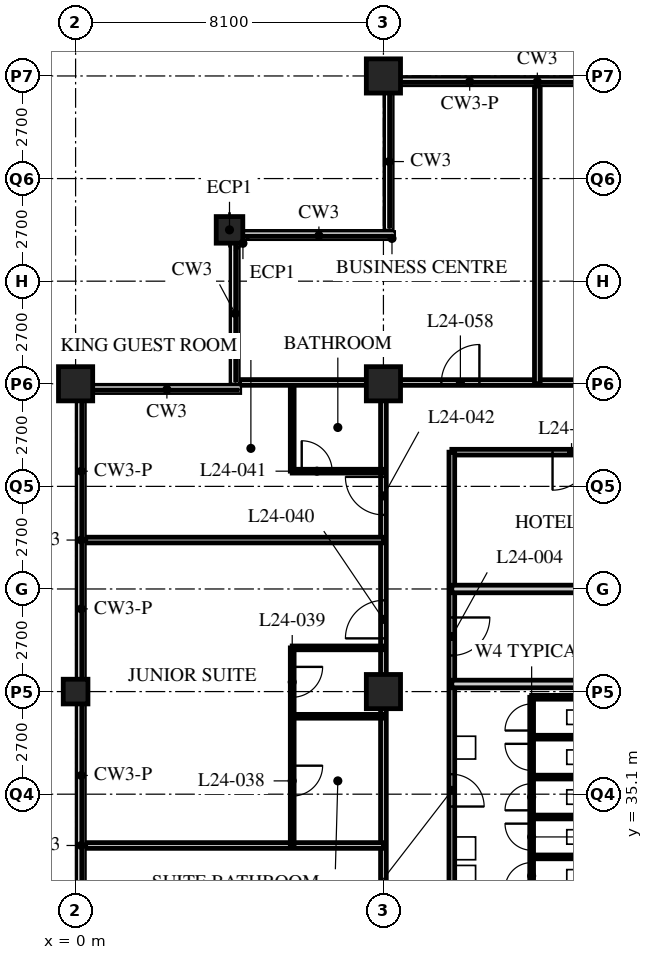
"""IFC4 building model, lengths in metres.
Left out: names, types, materials, properties, quantities, classifications, styles, units other than length and angle.
Written with IfcOpenShell. Run it as: python <this file> out.ifc"""

import sys

from ifc_helpers import new_model, si_unit, direction, frame, frame_2d, origin, origin_2d, place, context, subcontext, project, spatial, rectangle, hollow_rectangle, extrude, element, fill, save


model = new_model("IFC4")
c1 = context("Model", 3, precision=1e-05, world=origin(), true_north=direction((0.0, 1.0)))
c2 = subcontext(c1, "Body", "Model", "MODEL_VIEW")
j1 = project(units=[si_unit("LENGTHUNIT", "METRE"), si_unit("PLANEANGLEUNIT", "RADIAN")], contexts=[c1])
p1 = place(None, origin())
s1 = spatial("IfcSite", under=j1, at=p1, CompositionType="ELEMENT")
p2 = place(p1, origin())
s2 = spatial("IfcBuilding", under=s1, at=p2, CompositionType="ELEMENT")
p3 = place(p2, frame((0.0, 0.0, 98.0)))
s3 = spatial("IfcBuildingStorey", under=s2, at=p3, CompositionType="ELEMENT", Elevation=98.0)
p4 = place(p3, frame((0.0, 37.8, 0.0), z_axis=(0.0, 0.0, 1.0), x_axis=(1.0, 0.0, 0.0)))
e1 = element("IfcColumn", 1, at=p4, inside=s3, PredefinedType="COLUMN", context=c2, shape_type="SweptSolid", body=[
    extrude(hollow_rectangle(XDim=0.65, YDim=0.65, WallThickness=0.05, at=origin_2d()), origin(), (0.0, 0.0, 1.0), 5.4),
])
p5 = place(p3, frame((0.0, 45.9, 0.0), z_axis=(0.0, 0.0, 1.0), x_axis=(1.0, 0.0, 0.0)))
e2 = element("IfcColumn", 2, at=p5, inside=s3, PredefinedType="COLUMN", context=c2, shape_type="SweptSolid", body=[
    extrude(hollow_rectangle(XDim=0.9, YDim=0.9, WallThickness=0.09, at=origin_2d()), origin(), (0.0, 0.0, 1.0), 5.4),
])
p6 = place(p3, frame((4.05, 49.95, 0.0), z_axis=(0.0, 0.0, 1.0), x_axis=(1.0, 0.0, 0.0)))
e3 = element("IfcColumn", 3, at=p6, inside=s3, PredefinedType="COLUMN", context=c2, shape_type="SweptSolid", body=[
    extrude(hollow_rectangle(XDim=0.7, YDim=0.7, WallThickness=0.07, at=origin_2d()), origin(), (0.0, 0.0, 1.0), 5.4),
])
for number, where, z_axis, x_axis in (
    (4, (8.1, 37.8, 0.0), (0.0, 0.0, 1.0), (1.0, 0.0, 0.0)),
    (5, (8.1, 45.9, 0.0), (0.0, 0.0, 1.0), (1.0, 0.0, 0.0)),
):
    element("IfcColumn", number, at=place(p3, frame(where, z_axis=z_axis, x_axis=x_axis)), inside=s3, PredefinedType="COLUMN", context=c2, shape_type="SweptSolid", body=[
        extrude(hollow_rectangle(XDim=0.9, YDim=0.9, WallThickness=0.1, at=origin_2d()), origin(), (0.0, 0.0, 1.0), 5.4),
    ])
p7 = place(p3, frame((8.1, 54.0, 0.0), z_axis=(0.0, 0.0, 1.0), x_axis=(1.0, 0.0, 0.0)))
e6 = element("IfcColumn", 6, at=p7, inside=s3, PredefinedType="COLUMN", context=c2, shape_type="SweptSolid", body=[
    extrude(hollow_rectangle(XDim=0.9, YDim=0.9, WallThickness=0.09, at=origin_2d()), origin(), (0.0, 0.0, 1.0), 5.4),
])
p8 = place(p3, frame((8.1, 45.935, 0.0), z_axis=(0.0, 0.0, 1.0), x_axis=(0.99999962324, -0.000868055229, 0.0)))
e7 = element("IfcWall", 7, at=p8, inside=s3, PredefinedType="PARTITIONING", context=c2, shape_type="SweptSolid", body=[
    extrude(rectangle(XDim=40.5, YDim=0.15, at=frame_2d((20.25, 0.0))), origin(), (0.0, 0.0, 1.0), 4.49),
])
p9 = place(p8, frame((9.225, 0.0, 0.0)))
e8 = element("IfcOpeningElement", 8, at=p9, cuts=e7, PredefinedType="OPENING", context=c2, shape_type="SweptSolid", body=[
    extrude(rectangle(XDim=1.8, YDim=2.4, at=frame_2d((0.9, 1.2))), frame((0.0, 0.085, 0.0), z_axis=(0.0, -1.0, 0.0), x_axis=(1.0, 0.0, 0.0)), (0.0, 0.0, 1.0), 0.17),
])
p10 = place(p8, frame((21.65, 0.0, 0.0)))
e9 = element("IfcOpeningElement", 9, at=p10, cuts=e7, PredefinedType="OPENING", context=c2, shape_type="SweptSolid", body=[
    extrude(rectangle(XDim=1.0, YDim=2.1, at=frame_2d((0.5, 1.05))), frame((0.0, 0.085, 0.0), z_axis=(0.0, -1.0, 0.0), x_axis=(1.0, 0.0, 0.0)), (0.0, 0.0, 1.0), 0.17),
])
p11 = place(p8, frame((29.75, 0.0, 0.0)))
e10 = element("IfcOpeningElement", 10, at=p11, cuts=e7, PredefinedType="OPENING", context=c2, shape_type="SweptSolid", body=[
    extrude(rectangle(XDim=1.0, YDim=2.1, at=frame_2d((0.5, 1.05))), frame((0.0, 0.085, 0.0), z_axis=(0.0, -1.0, 0.0), x_axis=(1.0, 0.0, 0.0)), (0.0, 0.0, 1.0), 0.17),
])
p12 = place(p8, frame((34.85, 0.0, 0.0)))
e11 = element("IfcOpeningElement", 11, at=p12, cuts=e7, PredefinedType="OPENING", context=c2, shape_type="SweptSolid", body=[
    extrude(rectangle(XDim=1.0, YDim=2.1, at=frame_2d((0.5, 1.05))), frame((0.0, 0.085, 0.0), z_axis=(0.0, -1.0, 0.0), x_axis=(1.0, 0.0, 0.0)), (0.0, 0.0, 1.0), 0.17),
])
p13 = place(p8, frame((37.975, 0.0, 0.0)))
e12 = element("IfcOpeningElement", 12, at=p13, cuts=e7, PredefinedType="OPENING", context=c2, shape_type="SweptSolid", body=[
    extrude(rectangle(XDim=1.0, YDim=2.1, at=frame_2d((0.5, 1.05))), frame((0.0, 0.085, 0.0), z_axis=(0.0, -1.0, 0.0), x_axis=(1.0, 0.0, 0.0)), (0.0, 0.0, 1.0), 0.17),
])
p14 = place(p8, frame((1.525, 0.0, 0.0)))
e13 = element("IfcOpeningElement", 13, at=p14, cuts=e7, PredefinedType="OPENING", context=c2, shape_type="SweptSolid", body=[
    extrude(rectangle(XDim=1.0, YDim=2.1, at=frame_2d((0.5, 1.05))), frame((0.0, 0.085, 0.0), z_axis=(0.0, -1.0, 0.0), x_axis=(1.0, 0.0, 0.0)), (0.0, 0.0, 1.0), 0.17),
])
p15 = place(p3, frame((8.1, 13.5, 0.0), z_axis=(0.0, 0.0, 1.0), x_axis=(0.0, 1.0, 0.0)))
e14 = element("IfcWall", 14, at=p15, inside=s3, PredefinedType="PARTITIONING", context=c2, shape_type="SweptSolid", body=[
    extrude(rectangle(XDim=32.435, YDim=0.15, at=frame_2d((16.218, 0.0))), origin(), (0.0, 0.0, 1.0), 4.49),
])
p16 = place(p15, frame((1.525, 0.0, 0.0)))
e15 = element("IfcOpeningElement", 15, at=p16, cuts=e14, PredefinedType="OPENING", context=c2, shape_type="SweptSolid", body=[
    extrude(rectangle(XDim=1.0, YDim=2.1, at=frame_2d((0.5, 1.05))), frame((0.0, 0.085, 0.0), z_axis=(0.0, -1.0, 0.0), x_axis=(1.0, 0.0, 0.0)), (0.0, 0.0, 1.0), 0.17),
])
p17 = place(p15, frame((9.5, 0.0, 0.0)))
e16 = element("IfcOpeningElement", 16, at=p17, cuts=e14, PredefinedType="OPENING", context=c2, shape_type="SweptSolid", body=[
    extrude(rectangle(XDim=1.0, YDim=2.1, at=frame_2d((0.5, 1.05))), frame((0.0, 0.085, 0.0), z_axis=(0.0, -1.0, 0.0), x_axis=(1.0, 0.0, 0.0)), (0.0, 0.0, 1.0), 0.17),
])
p18 = place(p15, frame((17.6, 0.0, 0.0)))
e17 = element("IfcOpeningElement", 17, at=p18, cuts=e14, PredefinedType="OPENING", context=c2, shape_type="SweptSolid", body=[
    extrude(rectangle(XDim=1.0, YDim=2.1, at=frame_2d((0.5, 1.05))), frame((0.0, 0.085, 0.0), z_axis=(0.0, -1.0, 0.0), x_axis=(1.0, 0.0, 0.0)), (0.0, 0.0, 1.0), 0.17),
])
p19 = place(p15, frame((25.7, 0.0, 0.0)))
e18 = element("IfcOpeningElement", 18, at=p19, cuts=e14, PredefinedType="OPENING", context=c2, shape_type="SweptSolid", body=[
    extrude(rectangle(XDim=1.0, YDim=2.1, at=frame_2d((0.5, 1.05))), frame((0.0, 0.085, 0.0), z_axis=(0.0, -1.0, 0.0), x_axis=(1.0, 0.0, 0.0)), (0.0, 0.0, 1.0), 0.17),
])
p20 = place(p15, frame((28.95, 0.0, 0.0)))
e19 = element("IfcOpeningElement", 19, at=p20, cuts=e14, PredefinedType="OPENING", context=c2, shape_type="SweptSolid", body=[
    extrude(rectangle(XDim=1.0, YDim=2.1, at=frame_2d((0.5, 1.05))), frame((0.0, 0.085, 0.0), z_axis=(0.0, -1.0, 0.0), x_axis=(1.0, 0.0, 0.0)), (0.0, 0.0, 1.0), 0.17),
])
p21 = place(p3, frame((27.14, 44.1, 0.0), z_axis=(0.0, 0.0, 1.0), x_axis=(-1.0, 0.0, 0.0)))
e20 = element("IfcWall", 20, at=p21, inside=s3, PredefinedType="PARTITIONING", context=c2, shape_type="SweptSolid", body=[
    extrude(rectangle(XDim=17.24, YDim=0.15, at=frame_2d((8.62, 0.0))), origin(), (0.0, 0.0, 1.0), 5.19),
])
p22 = place(p21, frame((13.59, 0.0, 0.0)))
e21 = element("IfcOpeningElement", 21, at=p22, cuts=e20, PredefinedType="OPENING", context=c2, shape_type="SweptSolid", body=[
    extrude(rectangle(XDim=1.0, YDim=2.1, at=frame_2d((0.5, 1.05))), frame((0.0, 0.085, 0.0), z_axis=(0.0, -1.0, 0.0), x_axis=(1.0, 0.0, 0.0)), (0.0, 0.0, 1.0), 0.17),
])
p23 = place(p21, frame((4.965, 0.0, 0.0)))
e22 = element("IfcOpeningElement", 22, at=p23, cuts=e20, PredefinedType="OPENING", context=c2, shape_type="SweptSolid", body=[
    extrude(rectangle(XDim=1.0, YDim=2.1, at=frame_2d((0.5, 1.05))), frame((0.0, 0.085, 0.0), z_axis=(0.0, -1.0, 0.0), x_axis=(1.0, 0.0, 0.0)), (0.0, 0.0, 1.0), 0.17),
])
p24 = place(p3, frame((9.9, 44.1, 0.0), z_axis=(0.0, 0.0, 1.0), x_axis=(0.0, -1.0, 0.0)))
e23 = element("IfcWall", 23, at=p24, inside=s3, PredefinedType="PARTITIONING", context=c2, shape_type="SweptSolid", body=[
    extrude(rectangle(XDim=28.8, YDim=0.15, at=frame_2d((14.4, 0.0))), origin(), (0.0, 0.0, 1.0), 5.19),
])
p25 = place(p24, frame((16.975, 0.0, 0.0)))
e24 = element("IfcOpeningElement", 24, at=p25, cuts=e23, PredefinedType="OPENING", context=c2, shape_type="SweptSolid", body=[
    extrude(rectangle(XDim=0.85, YDim=2.1, at=frame_2d((0.425, 1.05))), frame((0.0, 0.085, 0.0), z_axis=(0.0, -1.0, 0.0), x_axis=(1.0, 0.0, 0.0)), (0.0, 0.0, 1.0), 0.17),
])
p26 = place(p24, frame((12.85, 0.0, 0.0)))
e25 = element("IfcOpeningElement", 25, at=p26, cuts=e23, PredefinedType="OPENING", context=c2, shape_type="SweptSolid", body=[
    extrude(rectangle(XDim=1.0, YDim=2.1, at=frame_2d((0.5, 1.05))), frame((0.0, 0.085, 0.0), z_axis=(0.0, -1.0, 0.0), x_axis=(1.0, 0.0, 0.0)), (0.0, 0.0, 1.0), 0.17),
])
p27 = place(p24, frame((8.475, 0.0, 0.0)))
e26 = element("IfcOpeningElement", 26, at=p27, cuts=e23, PredefinedType="OPENING", context=c2, shape_type="SweptSolid", body=[
    extrude(rectangle(XDim=0.85, YDim=2.1, at=frame_2d((0.425, 1.05))), frame((0.0, 0.085, 0.0), z_axis=(0.0, -1.0, 0.0), x_axis=(1.0, 0.0, 0.0)), (0.0, 0.0, 1.0), 0.17),
])
p28 = place(p24, frame((4.35, 0.0, 0.0)))
e27 = element("IfcOpeningElement", 27, at=p28, cuts=e23, PredefinedType="OPENING", context=c2, shape_type="SweptSolid", body=[
    extrude(rectangle(XDim=1.0, YDim=2.1, at=frame_2d((0.5, 1.05))), frame((0.0, 0.085, 0.0), z_axis=(0.0, -1.0, 0.0), x_axis=(1.0, 0.0, 0.0)), (0.0, 0.0, 1.0), 0.17),
])
p29 = place(p3, frame((9.9, 38.0, 0.0), z_axis=(0.0, 0.0, 1.0), x_axis=(1.0, 0.0, 0.0)))
e28 = element("IfcWall", 28, at=p29, inside=s3, PredefinedType="SOLIDWALL", context=c2, shape_type="SweptSolid", body=[
    extrude(rectangle(XDim=3.8, YDim=0.2, at=frame_2d((1.9, 0.0))), origin(), (0.0, 0.0, 1.0), 4.49),
])
p30 = place(p3, frame((9.9, 40.5, 0.0), z_axis=(0.0, 0.0, 1.0), x_axis=(1.0, 0.0, 0.0)))
e29 = element("IfcWall", 29, at=p30, inside=s3, PredefinedType="SOLIDWALL", context=c2, shape_type="SweptSolid", body=[
    extrude(rectangle(XDim=6.3, YDim=0.2, at=frame_2d((3.15, 0.0))), origin(), (0.0, 0.0, 1.0), 5.19),
])
p31 = place(p3, frame((8.1, 33.75, 0.0), z_axis=(0.0, 0.0, 1.0), x_axis=(-1.0, 0.0, 0.0)))
e30 = element("IfcWall", 30, at=p31, inside=s3, PredefinedType="PARTITIONING", context=c2, shape_type="SweptSolid", body=[
    extrude(rectangle(XDim=7.835, YDim=0.15, at=frame_2d((3.917, 0.0))), origin(), (0.0, 0.0, 1.0), 5.19),
])
p32 = place(p3, frame((5.7, 33.75, 0.0), z_axis=(0.0, 0.0, 1.0), x_axis=(0.0, 1.0, 0.0)))
e31 = element("IfcWall", 31, at=p32, inside=s3, PredefinedType="PARTITIONING", context=c2, shape_type="SweptSolid", body=[
    extrude(rectangle(XDim=5.2, YDim=0.1, at=frame_2d((2.6, 0.0))), origin(), (0.0, 0.0, 1.0), 5.19),
])
p33 = place(p32, frame((1.3, 0.0, 0.0)))
e32 = element("IfcOpeningElement", 32, at=p33, cuts=e31, PredefinedType="OPENING", context=c2, shape_type="SweptSolid", body=[
    extrude(rectangle(XDim=0.8, YDim=2.1, at=frame_2d((0.4, 1.05))), frame((0.0, 0.06, 0.0), z_axis=(0.0, -1.0, 0.0), x_axis=(1.0, 0.0, 0.0)), (0.0, 0.0, 1.0), 0.12),
])
p34 = place(p32, frame((3.9, 0.0, 0.0)))
e33 = element("IfcOpeningElement", 33, at=p34, cuts=e31, PredefinedType="OPENING", context=c2, shape_type="SweptSolid", body=[
    extrude(rectangle(XDim=0.8, YDim=2.1, at=frame_2d((0.4, 1.05))), frame((0.0, 0.06, 0.0), z_axis=(0.0, -1.0, 0.0), x_axis=(1.0, 0.0, 0.0)), (0.0, 0.0, 1.0), 0.12),
])
for number, where, z_axis, x_axis in (
    (34, (8.1, 37.15, 0.0), (0.0, 0.0, 1.0), (-1.0, 0.0, 0.0)),
    (35, (8.1, 38.95, 0.0), (0.0, 0.0, 1.0), (-1.0, 0.0, 0.0)),
):
    element("IfcWall", number, at=place(p3, frame(where, z_axis=z_axis, x_axis=x_axis)), inside=s3, PredefinedType="PARTITIONING", context=c2, shape_type="SweptSolid", body=[
        extrude(rectangle(XDim=2.4, YDim=0.1, at=frame_2d((1.2, 0.0))), origin(), (0.0, 0.0, 1.0), 5.19),
    ])
p35 = place(p3, frame((8.1, 41.788, 0.0), z_axis=(0.0, 0.0, 1.0), x_axis=(-1.0, 0.0, 0.0)))
e36 = element("IfcWall", 36, at=p35, inside=s3, PredefinedType="PARTITIONING", context=c2, shape_type="SweptSolid", body=[
    extrude(rectangle(XDim=7.835, YDim=0.15, at=frame_2d((3.917, 0.0))), origin(), (0.0, 0.0, 1.0), 5.19),
])
p36 = place(p3, frame((5.7, 43.6, 0.0), z_axis=(0.0, 0.0, 1.0), x_axis=(0.0, 1.0, 0.0)))
e37 = element("IfcWall", 37, at=p36, inside=s3, PredefinedType="PARTITIONING", context=c2, shape_type="SweptSolid", body=[
    extrude(rectangle(XDim=2.335, YDim=0.1, at=frame_2d((1.167, 0.0))), origin(), (0.0, 0.0, 1.0), 5.19),
])
p37 = place(p3, frame((8.1, 43.6, 0.0), z_axis=(0.0, 0.0, 1.0), x_axis=(-1.0, 0.0, 0.0)))
e38 = element("IfcWall", 38, at=p37, inside=s3, PredefinedType="PARTITIONING", context=c2, shape_type="SweptSolid", body=[
    extrude(rectangle(XDim=2.4, YDim=0.1, at=frame_2d((1.2, 0.0))), origin(), (0.0, 0.0, 1.0), 5.19),
])
p38 = place(p37, frame((1.35, 0.0, 0.0)))
e39 = element("IfcOpeningElement", 39, at=p38, cuts=e38, PredefinedType="OPENING", context=c2, shape_type="SweptSolid", body=[
    extrude(rectangle(XDim=0.8, YDim=2.1, at=frame_2d((0.4, 1.05))), frame((0.0, 0.06, 0.0), z_axis=(0.0, -1.0, 0.0), x_axis=(1.0, 0.0, 0.0)), (0.0, 0.0, 1.0), 0.12),
])
p39 = place(p3, frame((4.315, 45.935, 0.0), z_axis=(0.0, 0.0, 1.0), x_axis=(1.0, 0.0, 0.0)))
e40 = element("IfcWall", 40, at=p39, inside=s3, PredefinedType="PARTITIONING", context=c2, shape_type="SweptSolid", body=[
    extrude(rectangle(XDim=3.785, YDim=0.15, at=frame_2d((1.892, 0.0))), origin(), (0.0, 0.0, 1.0), 4.49),
])
p40 = place(p3, frame((12.15, 45.9, 0.0), z_axis=(0.0, 0.0, 1.0), x_axis=(0.0, 1.0, 0.0)))
e41 = element("IfcWall", 41, at=p40, inside=s3, PredefinedType="PARTITIONING", context=c2, shape_type="SweptSolid", body=[
    extrude(rectangle(XDim=7.835, YDim=0.15, at=frame_2d((3.917, 0.0))), origin(), (0.0, 0.0, 1.0), 5.19),
])
p41 = place(p3, frame((12.0, 32.4, 0.0), z_axis=(0.0, 0.0, 1.0), x_axis=(0.0, 1.0, 0.0)))
e42 = element("IfcWall", 42, at=p41, inside=s3, PredefinedType="PARTITIONING", context=c2, shape_type="SweptSolid", body=[
    extrude(rectangle(XDim=5.25, YDim=0.1, at=frame_2d((2.625, 0.0))), origin(), (0.0, 0.0, 1.0), 5.19),
])
p42 = place(p41, frame((0.2, 0.0, 0.0)))
e43 = element("IfcOpeningElement", 43, at=p42, cuts=e42, PredefinedType="OPENING", context=c2, shape_type="SweptSolid", body=[
    extrude(rectangle(XDim=0.7, YDim=2.0, at=frame_2d((0.35, 1.0))), frame((0.0, 0.06, 0.0), z_axis=(0.0, -1.0, 0.0), x_axis=(1.0, 0.0, 0.0)), (0.0, 0.0, 1.0), 0.12),
])
p43 = place(p41, frame((1.225, 0.0, 0.0)))
e44 = element("IfcOpeningElement", 44, at=p43, cuts=e42, PredefinedType="OPENING", context=c2, shape_type="SweptSolid", body=[
    extrude(rectangle(XDim=0.7, YDim=2.0, at=frame_2d((0.35, 1.0))), frame((0.0, 0.06, 0.0), z_axis=(0.0, -1.0, 0.0), x_axis=(1.0, 0.0, 0.0)), (0.0, 0.0, 1.0), 0.12),
])
p44 = place(p41, frame((2.275, 0.0, 0.0)))
e45 = element("IfcOpeningElement", 45, at=p44, cuts=e42, PredefinedType="OPENING", context=c2, shape_type="SweptSolid", body=[
    extrude(rectangle(XDim=0.7, YDim=2.0, at=frame_2d((0.35, 1.0))), frame((0.0, 0.06, 0.0), z_axis=(0.0, -1.0, 0.0), x_axis=(1.0, 0.0, 0.0)), (0.0, 0.0, 1.0), 0.12),
])
p45 = place(p41, frame((3.325, 0.0, 0.0)))
e46 = element("IfcOpeningElement", 46, at=p45, cuts=e42, PredefinedType="OPENING", context=c2, shape_type="SweptSolid", body=[
    extrude(rectangle(XDim=0.7, YDim=2.0, at=frame_2d((0.35, 1.0))), frame((0.0, 0.06, 0.0), z_axis=(0.0, -1.0, 0.0), x_axis=(1.0, 0.0, 0.0)), (0.0, 0.0, 1.0), 0.12),
])
p46 = place(p41, frame((4.375, 0.0, 0.0)))
e47 = element("IfcOpeningElement", 47, at=p46, cuts=e42, PredefinedType="OPENING", context=c2, shape_type="SweptSolid", body=[
    extrude(rectangle(XDim=0.7, YDim=2.0, at=frame_2d((0.35, 1.0))), frame((0.0, 0.06, 0.0), z_axis=(0.0, -1.0, 0.0), x_axis=(1.0, 0.0, 0.0)), (0.0, 0.0, 1.0), 0.12),
])
for number, where, z_axis, x_axis in (
    (48, (12.0, 33.45, 0.0), (0.0, 0.0, 1.0), (1.0, 0.0, 0.0)),
    (49, (12.0, 34.5, 0.0), (0.0, 0.0, 1.0), (1.0, 0.0, 0.0)),
    (50, (12.0, 35.55, 0.0), (0.0, 0.0, 1.0), (1.0, 0.0, 0.0)),
    (51, (12.0, 36.6, 0.0), (0.0, 0.0, 1.0), (1.0, 0.0, 0.0)),
):
    element("IfcWall", number, at=place(p3, frame(where, z_axis=z_axis, x_axis=x_axis)), inside=s3, PredefinedType="PARTITIONING", context=c2, shape_type="SweptSolid", body=[
        extrude(rectangle(XDim=1.7, YDim=0.1, at=frame_2d((0.85, 0.0))), origin(), (0.0, 0.0, 1.0), 5.19),
    ])
p47 = place(p3, frame((12.0, 37.65, 0.0), z_axis=(0.0, 0.0, 1.0), x_axis=(1.0, 0.0, 0.0)))
e52 = element("IfcWall", 52, at=p47, inside=s3, PredefinedType="PARTITIONING", context=c2, shape_type="SweptSolid", body=[
    extrude(rectangle(XDim=1.7, YDim=0.1, at=frame_2d((0.85, 0.0))), origin(), (0.0, 0.0, 1.0), 4.49),
])
p48 = place(p27, origin())
e53 = element("IfcDoor", 53, at=p48, inside=s3, OperationType="SINGLE_SWING_RIGHT", PredefinedType="DOOR", context=c2, shape_type="SweptSolid", body=[
    extrude(rectangle(XDim=0.85, YDim=2.1, at=frame_2d((0.425, 1.05))), frame((0.0, 0.025, 0.0), z_axis=(0.0, -1.0, 0.0), x_axis=(1.0, 0.0, 0.0)), (0.0, 0.0, 1.0), 0.05),
])
fill(e26, e53)
p49 = place(p28, origin())
e54 = element("IfcDoor", 54, at=p49, inside=s3, OperationType="SINGLE_SWING_LEFT", PredefinedType="DOOR", context=c2, shape_type="SweptSolid", body=[
    extrude(rectangle(XDim=1.0, YDim=2.1, at=frame_2d((0.5, 1.05))), frame((0.0, 0.025, 0.0), z_axis=(0.0, -1.0, 0.0), x_axis=(1.0, 0.0, 0.0)), (0.0, 0.0, 1.0), 0.05),
])
fill(e27, e54)
p50 = place(p22, origin())
e55 = element("IfcDoor", 55, at=p50, inside=s3, OperationType="SINGLE_SWING_RIGHT", PredefinedType="DOOR", context=c2, shape_type="SweptSolid", body=[
    extrude(rectangle(XDim=1.0, YDim=2.1, at=frame_2d((0.5, 1.05))), frame((0.0, 0.025, 0.0), z_axis=(0.0, -1.0, 0.0), x_axis=(1.0, 0.0, 0.0)), (0.0, 0.0, 1.0), 0.05),
])
fill(e21, e55)
p51 = place(p33, origin())
e56 = element("IfcDoor", 56, at=p51, inside=s3, OperationType="SINGLE_SWING_LEFT", PredefinedType="DOOR", context=c2, shape_type="SweptSolid", body=[
    extrude(rectangle(XDim=0.8, YDim=2.1, at=frame_2d((0.4, 1.05))), frame((0.0, 0.025, 0.0), z_axis=(0.0, -1.0, 0.0), x_axis=(1.0, 0.0, 0.0)), (0.0, 0.0, 1.0), 0.05),
])
fill(e32, e56)
p52 = place(p34, origin())
e57 = element("IfcDoor", 57, at=p52, inside=s3, OperationType="SINGLE_SWING_LEFT", PredefinedType="DOOR", context=c2, shape_type="SweptSolid", body=[
    extrude(rectangle(XDim=0.8, YDim=2.1, at=frame_2d((0.4, 1.05))), frame((0.0, 0.025, 0.0), z_axis=(0.0, -1.0, 0.0), x_axis=(1.0, 0.0, 0.0)), (0.0, 0.0, 1.0), 0.05),
])
fill(e33, e57)
p53 = place(p19, origin())
e58 = element("IfcDoor", 58, at=p53, inside=s3, OperationType="SINGLE_SWING_LEFT", PredefinedType="DOOR", context=c2, shape_type="SweptSolid", body=[
    extrude(rectangle(XDim=1.0, YDim=2.1, at=frame_2d((0.5, 1.05))), frame((0.0, 0.025, 0.0), z_axis=(0.0, -1.0, 0.0), x_axis=(1.0, 0.0, 0.0)), (0.0, 0.0, 1.0), 0.05),
])
fill(e18, e58)
p54 = place(p38, origin())
e59 = element("IfcDoor", 59, at=p54, inside=s3, OperationType="SINGLE_SWING_LEFT", PredefinedType="DOOR", context=c2, shape_type="SweptSolid", body=[
    extrude(rectangle(XDim=0.8, YDim=2.1, at=frame_2d((0.4, 1.05))), frame((0.0, 0.025, 0.0), z_axis=(0.0, -1.0, 0.0), x_axis=(1.0, 0.0, 0.0)), (0.0, 0.0, 1.0), 0.05),
])
fill(e39, e59)
p55 = place(p20, origin())
e60 = element("IfcDoor", 60, at=p55, inside=s3, OperationType="SINGLE_SWING_RIGHT", PredefinedType="DOOR", context=c2, shape_type="SweptSolid", body=[
    extrude(rectangle(XDim=1.0, YDim=2.1, at=frame_2d((0.5, 1.05))), frame((0.0, 0.025, 0.0), z_axis=(0.0, -1.0, 0.0), x_axis=(1.0, 0.0, 0.0)), (0.0, 0.0, 1.0), 0.05),
])
fill(e19, e60)
p56 = place(p14, origin())
e61 = element("IfcDoor", 61, at=p56, inside=s3, OperationType="SINGLE_SWING_RIGHT", PredefinedType="DOOR", context=c2, shape_type="SweptSolid", body=[
    extrude(rectangle(XDim=1.0, YDim=2.1, at=frame_2d((0.5, 1.05))), frame((0.0, 0.025, 0.0), z_axis=(0.0, -1.0, 0.0), x_axis=(1.0, 0.0, 0.0)), (0.0, 0.0, 1.0), 0.05),
])
fill(e13, e61)
p57 = place(p42, origin())
e62 = element("IfcDoor", 62, at=p57, inside=s3, OperationType="SINGLE_SWING_LEFT", PredefinedType="DOOR", context=c2, shape_type="SweptSolid", body=[
    extrude(rectangle(XDim=0.7, YDim=2.0, at=frame_2d((0.35, 1.0))), frame((0.0, 0.025, 0.0), z_axis=(0.0, -1.0, 0.0), x_axis=(1.0, 0.0, 0.0)), (0.0, 0.0, 1.0), 0.05),
])
fill(e43, e62)
p58 = place(p43, origin())
e63 = element("IfcDoor", 63, at=p58, inside=s3, OperationType="SINGLE_SWING_RIGHT", PredefinedType="DOOR", context=c2, shape_type="SweptSolid", body=[
    extrude(rectangle(XDim=0.7, YDim=2.0, at=frame_2d((0.35, 1.0))), frame((0.0, 0.025, 0.0), z_axis=(0.0, -1.0, 0.0), x_axis=(1.0, 0.0, 0.0)), (0.0, 0.0, 1.0), 0.05),
])
fill(e44, e63)
p59 = place(p44, origin())
e64 = element("IfcDoor", 64, at=p59, inside=s3, OperationType="SINGLE_SWING_LEFT", PredefinedType="DOOR", context=c2, shape_type="SweptSolid", body=[
    extrude(rectangle(XDim=0.7, YDim=2.0, at=frame_2d((0.35, 1.0))), frame((0.0, 0.025, 0.0), z_axis=(0.0, -1.0, 0.0), x_axis=(1.0, 0.0, 0.0)), (0.0, 0.0, 1.0), 0.05),
])
fill(e45, e64)
p60 = place(p45, origin())
e65 = element("IfcDoor", 65, at=p60, inside=s3, OperationType="SINGLE_SWING_RIGHT", PredefinedType="DOOR", context=c2, shape_type="SweptSolid", body=[
    extrude(rectangle(XDim=0.7, YDim=2.0, at=frame_2d((0.35, 1.0))), frame((0.0, 0.025, 0.0), z_axis=(0.0, -1.0, 0.0), x_axis=(1.0, 0.0, 0.0)), (0.0, 0.0, 1.0), 0.05),
])
fill(e46, e65)
p61 = place(p46, origin())
e66 = element("IfcDoor", 66, at=p61, inside=s3, OperationType="SINGLE_SWING_LEFT", PredefinedType="DOOR", context=c2, shape_type="SweptSolid", body=[
    extrude(rectangle(XDim=0.7, YDim=2.0, at=frame_2d((0.35, 1.0))), frame((0.0, 0.025, 0.0), z_axis=(0.0, -1.0, 0.0), x_axis=(1.0, 0.0, 0.0)), (0.0, 0.0, 1.0), 0.05),
])
fill(e47, e66)
save(model, sys.argv[1])
